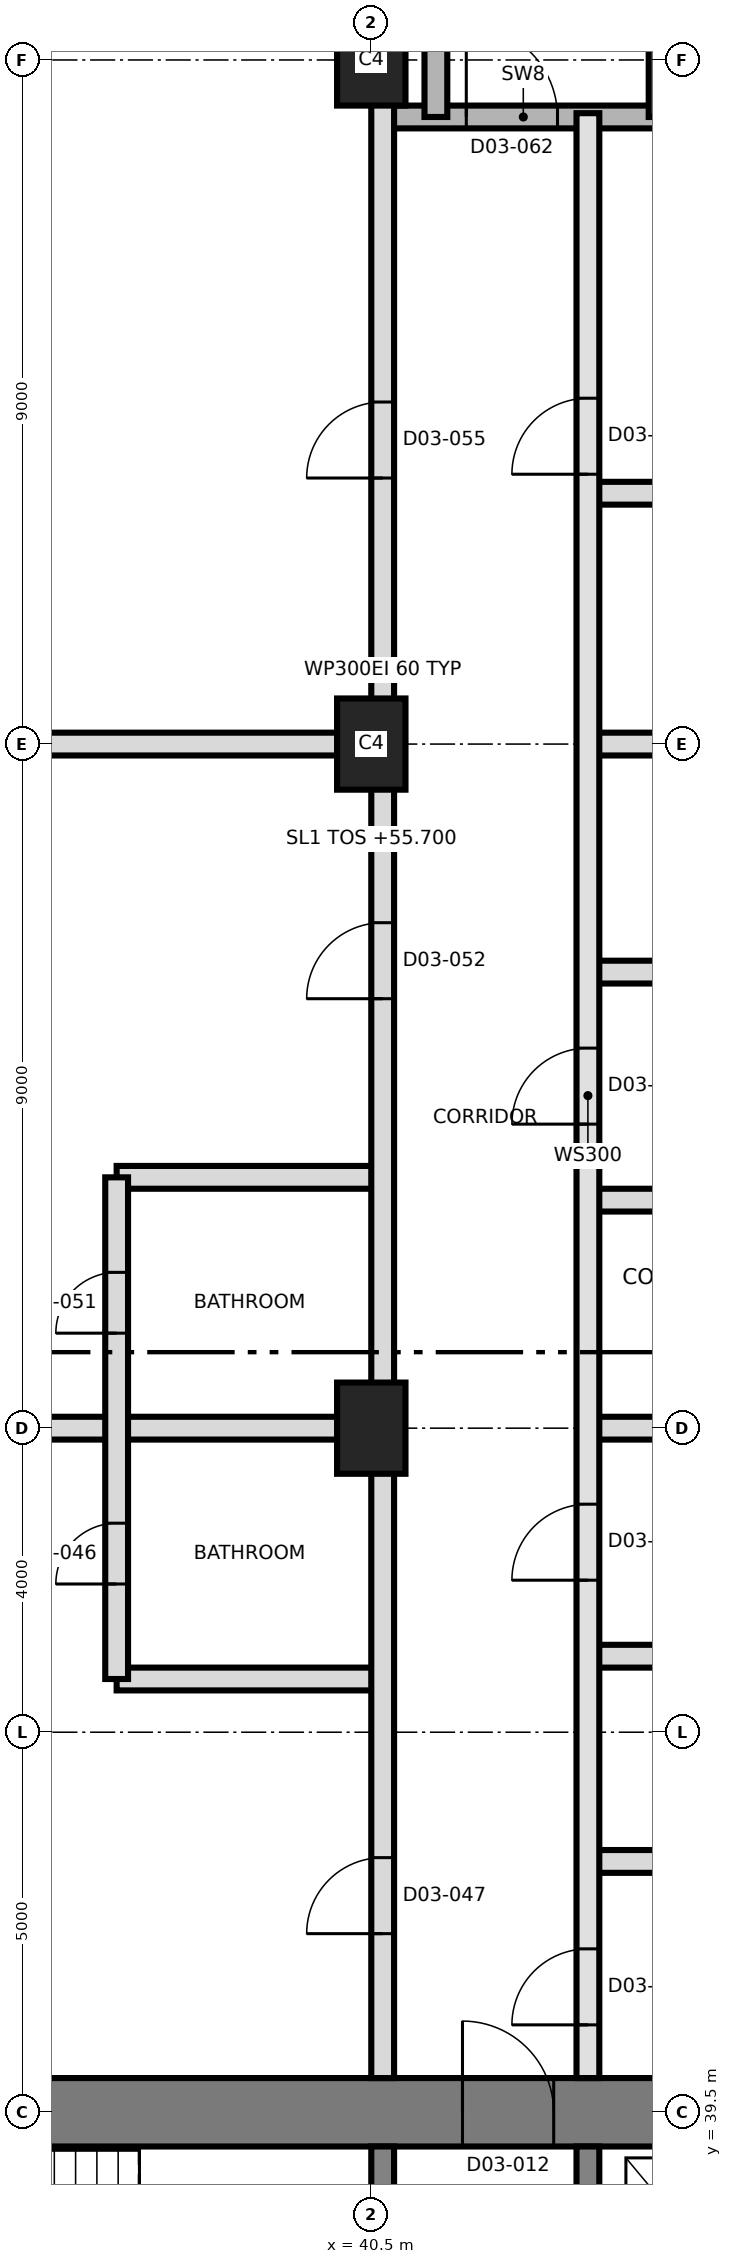
"""IFC4 building model, lengths in metres.
Left out: names, types, materials, properties, quantities, classifications, styles, units other than length and angle.
Written with IfcOpenShell. Run it as: python <this file> out.ifc"""

import sys

from ifc_helpers import new_model, si_unit, direction, frame, frame_2d, origin, origin_2d, place, context, subcontext, project, spatial, rectangle, extrude, element, fill, save


model = new_model("IFC4")
c1 = context("Model", 3, precision=1e-05, world=origin(), true_north=direction((0.0, 1.0)))
c2 = subcontext(c1, "Body", "Model", "MODEL_VIEW")
j1 = project(units=[si_unit("LENGTHUNIT", "METRE"), si_unit("PLANEANGLEUNIT", "RADIAN")], contexts=[c1])
p1 = place(None, origin())
s1 = spatial("IfcSite", under=j1, at=p1, CompositionType="ELEMENT")
p2 = place(p1, origin())
s2 = spatial("IfcBuilding", under=s1, at=p2, CompositionType="ELEMENT")
p3 = place(p2, frame((0.0, 0.0, 55.7)))
s3 = spatial("IfcBuildingStorey", under=s2, at=p3, CompositionType="ELEMENT", Elevation=55.7)
p4 = place(p3, frame((31.05, 39.5, 0.0), z_axis=(0.0, 0.0, 1.0), x_axis=(1.0, 0.0, 0.0)))
e1 = element("IfcWall", 1, at=p4, inside=s3, PredefinedType="SHEAR", context=c2, shape_type="SweptSolid", body=[
    extrude(rectangle(XDim=27.0, YDim=0.9, at=frame_2d((13.5, 0.0))), origin(), (0.0, 0.0, 1.0), 3.7),
])
p5 = place(p4, frame((10.65, 0.0, 0.0)))
e2 = element("IfcOpeningElement", 2, at=p5, cuts=e1, PredefinedType="OPENING", context=c2, shape_type="SweptSolid", body=[
    extrude(rectangle(XDim=1.2, YDim=2.1, at=frame_2d((0.6, 1.05))), frame((0.0, 0.46, 0.0), z_axis=(0.0, -1.0, 0.0), x_axis=(1.0, 0.0, 0.0)), (0.0, 0.0, 1.0), 0.92),
])
for number, where, z_axis, x_axis in (
    (3, (40.65, 33.5, 0.0), (0.0, 0.0, 1.0), (0.0, 1.0, 0.0)),
    (4, (43.35, 33.5, 0.0), (0.0, 0.0, 1.0), (0.0, 1.0, 0.0)),
):
    element("IfcWall", number, at=place(p3, frame(where, z_axis=z_axis, x_axis=x_axis)), inside=s3, PredefinedType="SHEAR", context=c2, shape_type="SweptSolid", body=[
        extrude(rectangle(XDim=5.55, YDim=0.3, at=frame_2d((2.775, 0.0))), origin(), (0.0, 0.0, 1.0), 3.7),
    ])
for number, where, z_axis, x_axis in (
    (5, (40.5, 48.5, 0.0), (0.0, 0.0, 1.0), (0.0, 1.0, 0.0)),
    (6, (40.5, 57.5, 0.0), (0.0, 0.0, 1.0), (0.0, 1.0, 0.0)),
    (7, (40.5, 66.5, 0.0), (0.0, 0.0, 1.0), (0.0, 1.0, 0.0)),
):
    element("IfcColumn", number, at=place(p3, frame(where, z_axis=z_axis, x_axis=x_axis)), inside=s3, PredefinedType="COLUMN", context=c2, shape_type="SweptSolid", body=[
        extrude(rectangle(XDim=1.2, YDim=0.9, at=origin_2d()), origin(), (0.0, 0.0, 1.0), 3.7),
    ])
p6 = place(p3, frame((43.35, 42.8, 0.0), z_axis=(0.0, 0.0, 1.0), x_axis=(1.0, 0.0, 0.0)))
e8 = element("IfcWall", 8, at=p6, inside=s3, PredefinedType="PARTITIONING", context=c2, shape_type="SweptSolid", body=[
    extrude(rectangle(XDim=3.2, YDim=0.3, at=frame_2d((1.6, 0.0))), origin(), (0.0, 0.0, 1.0), 3.4),
])
p7 = place(p3, frame((37.15, 45.2, 0.0), z_axis=(0.0, 0.0, 1.0), x_axis=(1.0, 0.0, 0.0)))
e9 = element("IfcWall", 9, at=p7, inside=s3, PredefinedType="PARTITIONING", context=c2, shape_type="SweptSolid", body=[
    extrude(rectangle(XDim=3.5, YDim=0.3, at=frame_2d((1.75, 0.0))), origin(), (0.0, 0.0, 1.0), 3.4),
])
p8 = place(p3, frame((43.35, 45.5, 0.0), z_axis=(0.0, 0.0, 1.0), x_axis=(1.0, 0.0, 0.0)))
e10 = element("IfcWall", 10, at=p8, inside=s3, PredefinedType="PARTITIONING", context=c2, shape_type="SweptSolid", body=[
    extrude(rectangle(XDim=8.125, YDim=0.3, at=frame_2d((4.062, 0.0))), origin(), (0.0, 0.0, 1.0), 3.4),
])
p9 = place(p3, frame((29.705, 48.5, 0.0), z_axis=(0.0, 0.0, 1.0), x_axis=(1.0, 0.0, 0.0)))
e11 = element("IfcWall", 11, at=p9, inside=s3, PredefinedType="PARTITIONING", context=c2, shape_type="SweptSolid", body=[
    extrude(rectangle(XDim=10.945, YDim=0.3, at=frame_2d((5.472, 0.0))), origin(), (0.0, 0.0, 1.0), 3.4),
])
p10 = place(p3, frame((43.35, 48.5, 0.0), z_axis=(0.0, 0.0, 1.0), x_axis=(1.0, 0.0, 0.0)))
e12 = element("IfcWall", 12, at=p10, inside=s3, PredefinedType="PARTITIONING", context=c2, shape_type="SweptSolid", body=[
    extrude(rectangle(XDim=8.125, YDim=0.3, at=frame_2d((4.062, 0.0))), origin(), (0.0, 0.0, 1.0), 3.4),
])
p11 = place(p3, frame((43.35, 51.5, 0.0), z_axis=(0.0, 0.0, 1.0), x_axis=(1.0, 0.0, 0.0)))
e13 = element("IfcWall", 13, at=p11, inside=s3, PredefinedType="PARTITIONING", context=c2, shape_type="SweptSolid", body=[
    extrude(rectangle(XDim=3.3, YDim=0.3, at=frame_2d((1.65, 0.0))), origin(), (0.0, 0.0, 1.0), 3.4),
])
p12 = place(p3, frame((37.15, 51.8, 0.0), z_axis=(0.0, 0.0, 1.0), x_axis=(1.0, 0.0, 0.0)))
e14 = element("IfcWall", 14, at=p12, inside=s3, PredefinedType="PARTITIONING", context=c2, shape_type="SweptSolid", body=[
    extrude(rectangle(XDim=3.5, YDim=0.3, at=frame_2d((1.75, 0.0))), origin(), (0.0, 0.0, 1.0), 3.4),
])
p13 = place(p3, frame((43.35, 54.5, 0.0), z_axis=(0.0, 0.0, 1.0), x_axis=(1.0, 0.0, 0.0)))
e15 = element("IfcWall", 15, at=p13, inside=s3, PredefinedType="PARTITIONING", context=c2, shape_type="SweptSolid", body=[
    extrude(rectangle(XDim=3.3, YDim=0.3, at=frame_2d((1.65, 0.0))), origin(), (0.0, 0.0, 1.0), 3.4),
])
p14 = place(p3, frame((29.705, 57.5, 0.0), z_axis=(0.0, 0.0, 1.0), x_axis=(1.0, 0.0, 0.0)))
e16 = element("IfcWall", 16, at=p14, inside=s3, PredefinedType="PARTITIONING", context=c2, shape_type="SweptSolid", body=[
    extrude(rectangle(XDim=10.945, YDim=0.3, at=frame_2d((5.472, 0.0))), origin(), (0.0, 0.0, 1.0), 3.4),
])
p15 = place(p3, frame((43.35, 57.5, 0.0), z_axis=(0.0, 0.0, 1.0), x_axis=(1.0, 0.0, 0.0)))
e17 = element("IfcWall", 17, at=p15, inside=s3, PredefinedType="PARTITIONING", context=c2, shape_type="SweptSolid", body=[
    extrude(rectangle(XDim=8.125, YDim=0.3, at=frame_2d((4.062, 0.0))), origin(), (0.0, 0.0, 1.0), 3.4),
])
p16 = place(p3, frame((43.35, 60.8, 0.0), z_axis=(0.0, 0.0, 1.0), x_axis=(1.0, 0.0, 0.0)))
e18 = element("IfcWall", 18, at=p16, inside=s3, PredefinedType="PARTITIONING", context=c2, shape_type="SweptSolid", body=[
    extrude(rectangle(XDim=3.5, YDim=0.3, at=frame_2d((1.75, 0.0))), origin(), (0.0, 0.0, 1.0), 3.4),
])
p17 = place(p3, frame((40.65, 65.75, 0.0), z_axis=(0.0, 0.0, 1.0), x_axis=(1.0, 0.0, 0.0)))
e19 = element("IfcWall", 19, at=p17, inside=s3, PredefinedType="SHEAR", context=c2, shape_type="SweptSolid", body=[
    extrude(rectangle(XDim=3.7, YDim=0.3, at=frame_2d((1.85, 0.0))), origin(), (0.0, 0.0, 1.0), 3.4),
])
p18 = place(p17, frame((1.1, 0.0, 0.0)))
e20 = element("IfcOpeningElement", 20, at=p18, cuts=e19, PredefinedType="OPENING", context=c2, shape_type="SweptSolid", body=[
    extrude(rectangle(XDim=1.2, YDim=2.1, at=frame_2d((0.6, 1.05))), frame((0.0, 0.16, 0.0), z_axis=(0.0, -1.0, 0.0), x_axis=(1.0, 0.0, 0.0)), (0.0, 0.0, 1.0), 0.32),
])
p19 = place(p3, frame((37.15, 45.2, 0.0), z_axis=(0.0, 0.0, 1.0), x_axis=(0.0, 1.0, 0.0)))
e21 = element("IfcWall", 21, at=p19, inside=s3, PredefinedType="PARTITIONING", context=c2, shape_type="SweptSolid", body=[
    extrude(rectangle(XDim=6.6, YDim=0.3, at=frame_2d((3.3, 0.0))), origin(), (0.0, 0.0, 1.0), 3.4),
])
p20 = place(p19, frame((1.25, 0.0, 0.0)))
e22 = element("IfcOpeningElement", 22, at=p20, cuts=e21, PredefinedType="OPENING", context=c2, shape_type="SweptSolid", body=[
    extrude(rectangle(XDim=0.8, YDim=2.1, at=frame_2d((0.4, 1.05))), frame((0.0, 0.16, 0.0), z_axis=(0.0, -1.0, 0.0), x_axis=(1.0, 0.0, 0.0)), (0.0, 0.0, 1.0), 0.32),
])
p21 = place(p19, frame((4.55, 0.0, 0.0)))
e23 = element("IfcOpeningElement", 23, at=p21, cuts=e21, PredefinedType="OPENING", context=c2, shape_type="SweptSolid", body=[
    extrude(rectangle(XDim=0.8, YDim=2.1, at=frame_2d((0.4, 1.05))), frame((0.0, 0.16, 0.0), z_axis=(0.0, -1.0, 0.0), x_axis=(1.0, 0.0, 0.0)), (0.0, 0.0, 1.0), 0.32),
])
p22 = place(p3, frame((40.65, 39.95, 0.0), z_axis=(0.0, 0.0, 1.0), x_axis=(0.0, 1.0, 0.0)))
e24 = element("IfcWall", 24, at=p22, inside=s3, PredefinedType="PARTITIONING", context=c2, shape_type="SweptSolid", body=[
    extrude(rectangle(XDim=37.05, YDim=0.3, at=frame_2d((18.525, 0.0))), origin(), (0.0, 0.0, 1.0), 3.4),
])
p23 = place(p22, frame((1.9, 0.0, 0.0)))
e25 = element("IfcOpeningElement", 25, at=p23, cuts=e24, PredefinedType="OPENING", context=c2, shape_type="SweptSolid", body=[
    extrude(rectangle(XDim=1.0, YDim=2.4, at=frame_2d((0.5, 1.2))), frame((0.0, 0.16, 0.0), z_axis=(0.0, -1.0, 0.0), x_axis=(1.0, 0.0, 0.0)), (0.0, 0.0, 1.0), 0.32),
])
p24 = place(p22, frame((14.2, 0.0, 0.0)))
e26 = element("IfcOpeningElement", 26, at=p24, cuts=e24, PredefinedType="OPENING", context=c2, shape_type="SweptSolid", body=[
    extrude(rectangle(XDim=1.0, YDim=2.4, at=frame_2d((0.5, 1.2))), frame((0.0, 0.16, 0.0), z_axis=(0.0, -1.0, 0.0), x_axis=(1.0, 0.0, 0.0)), (0.0, 0.0, 1.0), 0.32),
])
p25 = place(p22, frame((21.05, 0.0, 0.0)))
e27 = element("IfcOpeningElement", 27, at=p25, cuts=e24, PredefinedType="OPENING", context=c2, shape_type="SweptSolid", body=[
    extrude(rectangle(XDim=1.0, YDim=2.4, at=frame_2d((0.5, 1.2))), frame((0.0, 0.16, 0.0), z_axis=(0.0, -1.0, 0.0), x_axis=(1.0, 0.0, 0.0)), (0.0, 0.0, 1.0), 0.32),
])
p26 = place(p3, frame((41.35, 65.75, 0.0), z_axis=(0.0, 0.0, 1.0), x_axis=(0.0, 1.0, 0.0)))
e28 = element("IfcWall", 28, at=p26, inside=s3, PredefinedType="SHEAR", context=c2, shape_type="SweptSolid", body=[
    extrude(rectangle(XDim=8.85, YDim=0.3, at=frame_2d((4.425, 0.0))), origin(), (0.0, 0.0, 1.0), 3.4),
])
p27 = place(p3, frame((43.35, 39.95, 0.0), z_axis=(0.0, 0.0, 1.0), x_axis=(0.0, 1.0, 0.0)))
e29 = element("IfcWall", 29, at=p27, inside=s3, PredefinedType="SOLIDWALL", context=c2, shape_type="SweptSolid", body=[
    extrude(rectangle(XDim=25.85, YDim=0.3, at=frame_2d((12.925, 0.0))), origin(), (0.0, 0.0, 1.0), 3.4),
])
p28 = place(p27, frame((0.7, 0.0, 0.0)))
e30 = element("IfcOpeningElement", 30, at=p28, cuts=e29, PredefinedType="OPENING", context=c2, shape_type="SweptSolid", body=[
    extrude(rectangle(XDim=1.0, YDim=2.1, at=frame_2d((0.5, 1.05))), frame((0.0, 0.16, 0.0), z_axis=(0.0, -1.0, 0.0), x_axis=(1.0, 0.0, 0.0)), (0.0, 0.0, 1.0), 0.32),
])
p29 = place(p27, frame((6.55, 0.0, 0.0)))
e31 = element("IfcOpeningElement", 31, at=p29, cuts=e29, PredefinedType="OPENING", context=c2, shape_type="SweptSolid", body=[
    extrude(rectangle(XDim=1.0, YDim=2.1, at=frame_2d((0.5, 1.05))), frame((0.0, 0.16, 0.0), z_axis=(0.0, -1.0, 0.0), x_axis=(1.0, 0.0, 0.0)), (0.0, 0.0, 1.0), 0.32),
])
p30 = place(p27, frame((12.55, 0.0, 0.0)))
e32 = element("IfcOpeningElement", 32, at=p30, cuts=e29, PredefinedType="OPENING", context=c2, shape_type="SweptSolid", body=[
    extrude(rectangle(XDim=1.0, YDim=2.4, at=frame_2d((0.5, 1.2))), frame((0.0, 0.16, 0.0), z_axis=(0.0, -1.0, 0.0), x_axis=(1.0, 0.0, 0.0)), (0.0, 0.0, 1.0), 0.32),
])
p31 = place(p27, frame((21.1, 0.0, 0.0)))
e33 = element("IfcOpeningElement", 33, at=p31, cuts=e29, PredefinedType="OPENING", context=c2, shape_type="SweptSolid", body=[
    extrude(rectangle(XDim=1.0, YDim=2.4, at=frame_2d((0.5, 1.2))), frame((0.0, 0.16, 0.0), z_axis=(0.0, -1.0, 0.0), x_axis=(1.0, 0.0, 0.0)), (0.0, 0.0, 1.0), 0.32),
])
p32 = place(p3, frame((44.3, 65.75, 0.0), z_axis=(0.0, 0.0, 1.0), x_axis=(0.0, 1.0, 0.0)))
e34 = element("IfcWall", 34, at=p32, inside=s3, PredefinedType="SHEAR", context=c2, shape_type="SweptSolid", body=[
    extrude(rectangle(XDim=8.85, YDim=0.3, at=frame_2d((4.425, 0.0))), origin(), (0.0, 0.0, 1.0), 3.4),
])
p33 = place(p5, origin())
e35 = element("IfcDoor", 35, at=p33, inside=s3, OperationType="SINGLE_SWING_RIGHT", PredefinedType="DOOR", context=c2, shape_type="SweptSolid", body=[
    extrude(rectangle(XDim=1.2, YDim=2.1, at=frame_2d((0.6, 1.05))), frame((0.0, 0.025, 0.0), z_axis=(0.0, -1.0, 0.0), x_axis=(1.0, 0.0, 0.0)), (0.0, 0.0, 1.0), 0.05),
])
fill(e2, e35)
p34 = place(p28, origin())
e36 = element("IfcDoor", 36, at=p34, inside=s3, OperationType="SINGLE_SWING_RIGHT", PredefinedType="DOOR", context=c2, shape_type="SweptSolid", body=[
    extrude(rectangle(XDim=1.0, YDim=2.1, at=frame_2d((0.5, 1.05))), frame((0.0, 0.025, 0.0), z_axis=(0.0, -1.0, 0.0), x_axis=(1.0, 0.0, 0.0)), (0.0, 0.0, 1.0), 0.05),
])
fill(e30, e36)
p35 = place(p29, origin())
e37 = element("IfcDoor", 37, at=p35, inside=s3, OperationType="SINGLE_SWING_LEFT", PredefinedType="DOOR", context=c2, shape_type="SweptSolid", body=[
    extrude(rectangle(XDim=1.0, YDim=2.1, at=frame_2d((0.5, 1.05))), frame((0.0, 0.025, 0.0), z_axis=(0.0, -1.0, 0.0), x_axis=(1.0, 0.0, 0.0)), (0.0, 0.0, 1.0), 0.05),
])
fill(e31, e37)
p36 = place(p20, origin())
e38 = element("IfcDoor", 38, at=p36, inside=s3, OperationType="SINGLE_SWING_LEFT", PredefinedType="DOOR", context=c2, shape_type="SweptSolid", body=[
    extrude(rectangle(XDim=0.8, YDim=2.1, at=frame_2d((0.4, 1.05))), frame((0.0, 0.025, 0.0), z_axis=(0.0, -1.0, 0.0), x_axis=(1.0, 0.0, 0.0)), (0.0, 0.0, 1.0), 0.05),
])
fill(e22, e38)
p37 = place(p23, origin())
e39 = element("IfcDoor", 39, at=p37, inside=s3, OperationType="SINGLE_SWING_RIGHT", PredefinedType="DOOR", context=c2, shape_type="SweptSolid", body=[
    extrude(rectangle(XDim=1.0, YDim=2.4, at=frame_2d((0.5, 1.2))), frame((0.0, 0.025, 0.0), z_axis=(0.0, -1.0, 0.0), x_axis=(1.0, 0.0, 0.0)), (0.0, 0.0, 1.0), 0.05),
])
fill(e25, e39)
p38 = place(p30, origin())
e40 = element("IfcDoor", 40, at=p38, inside=s3, OperationType="SINGLE_SWING_LEFT", PredefinedType="DOOR", context=c2, shape_type="SweptSolid", body=[
    extrude(rectangle(XDim=1.0, YDim=2.4, at=frame_2d((0.5, 1.2))), frame((0.0, 0.025, 0.0), z_axis=(0.0, -1.0, 0.0), x_axis=(1.0, 0.0, 0.0)), (0.0, 0.0, 1.0), 0.05),
])
fill(e32, e40)
p39 = place(p21, origin())
e41 = element("IfcDoor", 41, at=p39, inside=s3, OperationType="SINGLE_SWING_RIGHT", PredefinedType="DOOR", context=c2, shape_type="SweptSolid", body=[
    extrude(rectangle(XDim=0.8, YDim=2.1, at=frame_2d((0.4, 1.05))), frame((0.0, 0.025, 0.0), z_axis=(0.0, -1.0, 0.0), x_axis=(1.0, 0.0, 0.0)), (0.0, 0.0, 1.0), 0.05),
])
fill(e23, e41)
p40 = place(p24, origin())
e42 = element("IfcDoor", 42, at=p40, inside=s3, OperationType="SINGLE_SWING_LEFT", PredefinedType="DOOR", context=c2, shape_type="SweptSolid", body=[
    extrude(rectangle(XDim=1.0, YDim=2.4, at=frame_2d((0.5, 1.2))), frame((0.0, 0.025, 0.0), z_axis=(0.0, -1.0, 0.0), x_axis=(1.0, 0.0, 0.0)), (0.0, 0.0, 1.0), 0.05),
])
fill(e26, e42)
p41 = place(p31, origin())
e43 = element("IfcDoor", 43, at=p41, inside=s3, OperationType="SINGLE_SWING_LEFT", PredefinedType="DOOR", context=c2, shape_type="SweptSolid", body=[
    extrude(rectangle(XDim=1.0, YDim=2.4, at=frame_2d((0.5, 1.2))), frame((0.0, 0.025, 0.0), z_axis=(0.0, -1.0, 0.0), x_axis=(1.0, 0.0, 0.0)), (0.0, 0.0, 1.0), 0.05),
])
fill(e33, e43)
p42 = place(p25, origin())
e44 = element("IfcDoor", 44, at=p42, inside=s3, OperationType="SINGLE_SWING_RIGHT", PredefinedType="DOOR", context=c2, shape_type="SweptSolid", body=[
    extrude(rectangle(XDim=1.0, YDim=2.4, at=frame_2d((0.5, 1.2))), frame((0.0, 0.025, 0.0), z_axis=(0.0, -1.0, 0.0), x_axis=(1.0, 0.0, 0.0)), (0.0, 0.0, 1.0), 0.05),
])
fill(e27, e44)
p43 = place(p18, origin())
e45 = element("IfcDoor", 45, at=p43, inside=s3, OperationType="SINGLE_SWING_RIGHT", PredefinedType="DOOR", context=c2, shape_type="SweptSolid", body=[
    extrude(rectangle(XDim=1.2, YDim=2.1, at=frame_2d((0.6, 1.05))), frame((0.0, 0.025, 0.0), z_axis=(0.0, -1.0, 0.0), x_axis=(1.0, 0.0, 0.0)), (0.0, 0.0, 1.0), 0.05),
])
fill(e20, e45)
save(model, sys.argv[1])
